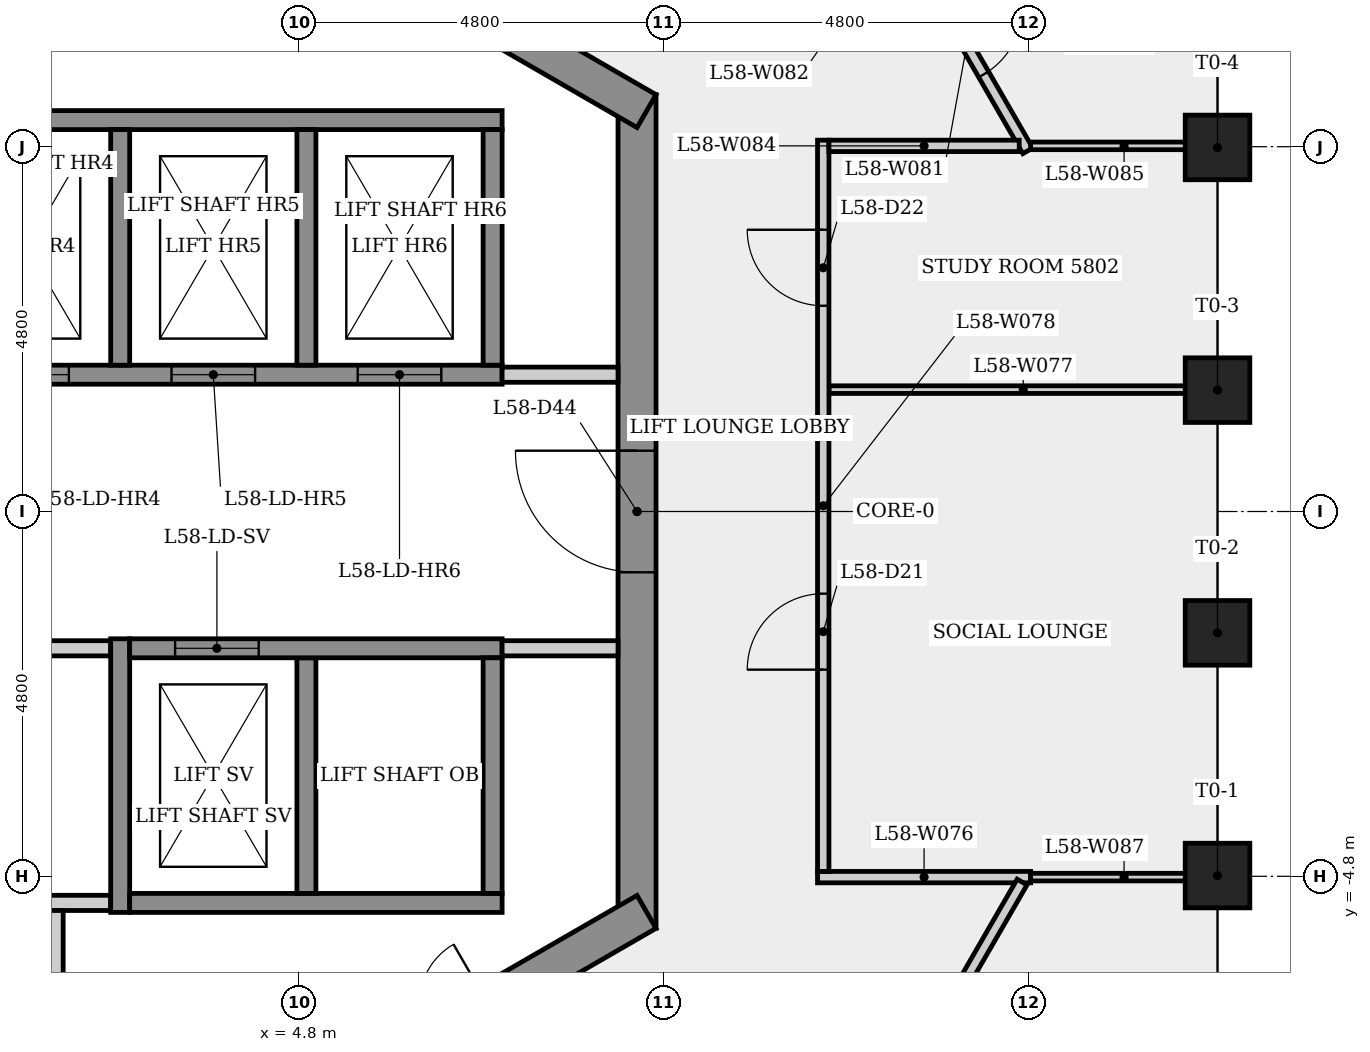
"""IFC4 building model, lengths in metres.
Left out: names, types, materials, properties, quantities, classifications, styles, units other than length and angle.
Written with IfcOpenShell. Run it as: python <this file> out.ifc"""

import sys

from ifc_helpers import new_model, si_unit, direction, frame, frame_2d, origin, origin_2d, place, context, subcontext, project, spatial, rectangle, extrude, element, fill, save


model = new_model("IFC4")
c1 = context("Model", 3, precision=1e-05, world=origin(), true_north=direction((0.0, 1.0)))
c2 = subcontext(c1, "Body", "Model", "MODEL_VIEW")
j1 = project(units=[si_unit("LENGTHUNIT", "METRE"), si_unit("PLANEANGLEUNIT", "RADIAN")], contexts=[c1])
p1 = place(None, origin())
s1 = spatial("IfcSite", under=j1, at=p1, CompositionType="ELEMENT")
p2 = place(p1, origin())
s2 = spatial("IfcBuilding", under=s1, at=p2, CompositionType="ELEMENT")
p3 = place(p2, frame((0.0, 0.0, 218.9)))
s3 = spatial("IfcBuildingStorey", under=s2, at=p3, CompositionType="ELEMENT", Elevation=218.9)
p4 = place(p3, frame((9.25, -5.485, 0.0), z_axis=(0.0, 0.0, 1.0), x_axis=(0.0, 1.0, 0.0)))
e1 = element("IfcWall", 1, at=p4, inside=s3, PredefinedType="SHEAR", context=c2, shape_type="SweptSolid", body=[
    extrude(rectangle(XDim=10.97, YDim=0.5, at=frame_2d((5.485, 0.0))), origin(), (0.0, 0.0, 1.0), 3.4),
])
p5 = place(p4, frame((4.685, 0.0, 0.0)))
e2 = element("IfcOpeningElement", 2, at=p5, cuts=e1, PredefinedType="OPENING", context=c2, shape_type="SweptSolid", body=[
    extrude(rectangle(XDim=1.6, YDim=2.1, at=frame_2d((0.8, 1.05))), frame((0.0, 0.26, 0.0), z_axis=(0.0, -1.0, 0.0), x_axis=(1.0, 0.0, 0.0)), (0.0, 0.0, 1.0), 0.52),
])
p6 = place(p3, frame((9.375, 5.268, 0.0), z_axis=(0.0, 0.0, 1.0), x_axis=(-0.866023993627, 0.500002442456, 0.0)))
e3 = element("IfcWall", 3, at=p6, inside=s3, PredefinedType="SHEAR", context=c2, shape_type="SweptSolid", body=[
    extrude(rectangle(XDim=10.97, YDim=0.5, at=frame_2d((5.485, 0.0))), origin(), (0.0, 0.0, 1.0), 3.4),
])
p7 = place(p6, frame((5.382, 0.0, 0.0)))
e4 = element("IfcOpeningElement", 4, at=p7, cuts=e3, PredefinedType="OPENING", context=c2, shape_type="SweptSolid", body=[
    extrude(rectangle(XDim=0.9, YDim=2.1, at=frame_2d((0.45, 1.05))), frame((0.0, 0.26, 0.0), z_axis=(0.0, -1.0, 0.0), x_axis=(1.0, 0.0, 0.0)), (0.0, 0.0, 1.0), 0.52),
])
p8 = place(p3, frame((-0.125, -10.753, 0.0), z_axis=(0.0, 0.0, 1.0), x_axis=(0.866023993627, 0.500002442456, 0.0)))
e5 = element("IfcWall", 5, at=p8, inside=s3, PredefinedType="SHEAR", context=c2, shape_type="SweptSolid", body=[
    extrude(rectangle(XDim=10.97, YDim=0.5, at=frame_2d((5.485, 0.0))), origin(), (0.0, 0.0, 1.0), 3.4),
])
p9 = place(p8, frame((7.657, 0.0, 0.0)))
e6 = element("IfcOpeningElement", 6, at=p9, cuts=e5, PredefinedType="OPENING", context=c2, shape_type="SweptSolid", body=[
    extrude(rectangle(XDim=0.9, YDim=2.1, at=frame_2d((0.45, 1.05))), frame((0.0, 0.26, 0.0), z_axis=(0.0, -1.0, 0.0), x_axis=(1.0, 0.0, 0.0)), (0.0, 0.0, 1.0), 0.52),
])
for number, where, z_axis, x_axis in (
    (7, (16.887, -4.79, 0.0), (0.0, 0.0, 1.0), (1.0, 0.0, 0.0)),
    (8, (16.887, -1.597, 0.0), (0.0, 0.0, 1.0), (1.0, 0.0, 0.0)),
    (9, (16.887, 1.597, 0.0), (0.0, 0.0, 1.0), (1.0, 0.0, 0.0)),
    (10, (16.887, 4.79, 0.0), (0.0, 0.0, 1.0), (1.0, 0.0, 0.0)),
):
    element("IfcColumn", number, at=place(p3, frame(where, z_axis=z_axis, x_axis=x_axis)), inside=s3, PredefinedType="COLUMN", context=c2, shape_type="SweptSolid", body=[
        extrude(rectangle(XDim=0.85, YDim=0.85, at=origin_2d()), origin(), (0.0, 0.0, 1.0), 3.4),
    ])
p10 = place(p3, frame((-9.0, -5.15, 0.0), z_axis=(0.0, 0.0, 1.0), x_axis=(1.0, 0.0, 0.0)))
e11 = element("IfcWall", 11, at=p10, inside=s3, PredefinedType="PARTITIONING", context=c2, shape_type="SweptSolid", body=[
    extrude(rectangle(XDim=11.325, YDim=0.2, at=frame_2d((5.663, 0.0))), origin(), (0.0, 0.0, 1.0), 3.05),
])
p11 = place(p3, frame((-7.475, 1.8, 0.0), z_axis=(0.0, 0.0, 1.0), x_axis=(1.0, 0.0, 0.0)))
e12 = element("IfcWall", 12, at=p11, inside=s3, PredefinedType="SHEAR", context=c2, shape_type="SweptSolid", body=[
    extrude(rectangle(XDim=14.95, YDim=0.25, at=frame_2d((7.475, 0.0))), origin(), (0.0, 0.0, 1.0), 3.05),
])
p12 = place(p11, frame((0.8, 0.0, 0.0)))
e13 = element("IfcOpeningElement", 13, at=p12, cuts=e12, PredefinedType="OPENING", context=c2, shape_type="SweptSolid", body=[
    extrude(rectangle(XDim=1.1, YDim=2.1, at=frame_2d((0.55, 1.05))), frame((0.0, 0.135, 0.0), z_axis=(0.0, -1.0, 0.0), x_axis=(1.0, 0.0, 0.0)), (0.0, 0.0, 1.0), 0.27),
])
p13 = place(p11, frame((3.25, 0.0, 0.0)))
e14 = element("IfcOpeningElement", 14, at=p13, cuts=e12, PredefinedType="OPENING", context=c2, shape_type="SweptSolid", body=[
    extrude(rectangle(XDim=1.1, YDim=2.1, at=frame_2d((0.55, 1.05))), frame((0.0, 0.135, 0.0), z_axis=(0.0, -1.0, 0.0), x_axis=(1.0, 0.0, 0.0)), (0.0, 0.0, 1.0), 0.27),
])
p14 = place(p11, frame((5.7, 0.0, 0.0)))
e15 = element("IfcOpeningElement", 15, at=p14, cuts=e12, PredefinedType="OPENING", context=c2, shape_type="SweptSolid", body=[
    extrude(rectangle(XDim=1.1, YDim=2.1, at=frame_2d((0.55, 1.05))), frame((0.0, 0.135, 0.0), z_axis=(0.0, -1.0, 0.0), x_axis=(1.0, 0.0, 0.0)), (0.0, 0.0, 1.0), 0.27),
])
p15 = place(p11, frame((8.15, 0.0, 0.0)))
e16 = element("IfcOpeningElement", 16, at=p15, cuts=e12, PredefinedType="OPENING", context=c2, shape_type="SweptSolid", body=[
    extrude(rectangle(XDim=1.1, YDim=2.1, at=frame_2d((0.55, 1.05))), frame((0.0, 0.135, 0.0), z_axis=(0.0, -1.0, 0.0), x_axis=(1.0, 0.0, 0.0)), (0.0, 0.0, 1.0), 0.27),
])
p16 = place(p11, frame((10.6, 0.0, 0.0)))
e17 = element("IfcOpeningElement", 17, at=p16, cuts=e12, PredefinedType="OPENING", context=c2, shape_type="SweptSolid", body=[
    extrude(rectangle(XDim=1.1, YDim=2.1, at=frame_2d((0.55, 1.05))), frame((0.0, 0.135, 0.0), z_axis=(0.0, -1.0, 0.0), x_axis=(1.0, 0.0, 0.0)), (0.0, 0.0, 1.0), 0.27),
])
p17 = place(p11, frame((13.05, 0.0, 0.0)))
e18 = element("IfcOpeningElement", 18, at=p17, cuts=e12, PredefinedType="OPENING", context=c2, shape_type="SweptSolid", body=[
    extrude(rectangle(XDim=1.1, YDim=2.1, at=frame_2d((0.55, 1.05))), frame((0.0, 0.135, 0.0), z_axis=(0.0, -1.0, 0.0), x_axis=(1.0, 0.0, 0.0)), (0.0, 0.0, 1.0), 0.27),
])
p18 = place(p3, frame((-7.225, 5.15, 0.0), z_axis=(0.0, 0.0, 1.0), x_axis=(1.0, 0.0, 0.0)))
e19 = element("IfcWall", 19, at=p18, inside=s3, PredefinedType="SHEAR", context=c2, shape_type="SweptSolid", body=[
    extrude(rectangle(XDim=14.7, YDim=0.25, at=frame_2d((7.35, 0.0))), origin(), (0.0, 0.0, 1.0), 3.05),
])
p19 = place(p3, frame((-9.0, -1.8, 0.0), z_axis=(0.0, 0.0, 1.0), x_axis=(1.0, 0.0, 0.0)))
e20 = element("IfcWall", 20, at=p19, inside=s3, PredefinedType="PARTITIONING", context=c2, shape_type="SweptSolid", body=[
    extrude(rectangle(XDim=11.325, YDim=0.2, at=frame_2d((5.663, 0.0))), origin(), (0.0, 0.0, 1.0), 3.05),
])
p20 = place(p19, frame((2.635, 0.0, 0.0)))
e21 = element("IfcOpeningElement", 21, at=p20, cuts=e20, PredefinedType="OPENING", context=c2, shape_type="SweptSolid", body=[
    extrude(rectangle(XDim=0.9, YDim=2.1, at=frame_2d((0.45, 1.05))), frame((0.0, 0.11, 0.0), z_axis=(0.0, -1.0, 0.0), x_axis=(1.0, 0.0, 0.0)), (0.0, 0.0, 1.0), 0.22),
])
p21 = place(p19, frame((8.488, 0.0, 0.0)))
e22 = element("IfcOpeningElement", 22, at=p21, cuts=e20, PredefinedType="OPENING", context=c2, shape_type="SweptSolid", body=[
    extrude(rectangle(XDim=0.9, YDim=2.1, at=frame_2d((0.45, 1.05))), frame((0.0, 0.11, 0.0), z_axis=(0.0, -1.0, 0.0), x_axis=(1.0, 0.0, 0.0)), (0.0, 0.0, 1.0), 0.22),
])
p22 = place(p3, frame((1.6, -5.25, 0.0), z_axis=(0.0, 0.0, 1.0), x_axis=(0.0, -1.0, 0.0)))
e23 = element("IfcWall", 23, at=p22, inside=s3, PredefinedType="PARTITIONING", context=c2, shape_type="SweptSolid", body=[
    extrude(rectangle(XDim=4.219, YDim=0.2, at=frame_2d((2.109, 0.0))), origin(), (0.0, 0.0, 1.0), 3.05),
])
p23 = place(p3, frame((2.45, -5.275, 0.0), z_axis=(0.0, 0.0, 1.0), x_axis=(0.0, 1.0, 0.0)))
e24 = element("IfcWall", 24, at=p23, inside=s3, PredefinedType="SHEAR", context=c2, shape_type="SweptSolid", body=[
    extrude(rectangle(XDim=3.6, YDim=0.25, at=frame_2d((1.8, 0.0))), origin(), (0.0, 0.0, 1.0), 3.05),
])
p24 = place(p3, frame((2.45, 5.025, 0.0), z_axis=(0.0, 0.0, 1.0), x_axis=(0.0, -1.0, 0.0)))
e25 = element("IfcWall", 25, at=p24, inside=s3, PredefinedType="SHEAR", context=c2, shape_type="SweptSolid", body=[
    extrude(rectangle(XDim=3.1, YDim=0.25, at=frame_2d((1.55, 0.0))), origin(), (0.0, 0.0, 1.0), 3.4),
])
p25 = place(p3, frame((2.575, -5.15, 0.0), z_axis=(0.0, 0.0, 1.0), x_axis=(1.0, 0.0, 0.0)))
e26 = element("IfcWall", 26, at=p25, inside=s3, PredefinedType="SHEAR", context=c2, shape_type="SweptSolid", body=[
    extrude(rectangle(XDim=4.9, YDim=0.25, at=frame_2d((2.45, 0.0))), origin(), (0.0, 0.0, 1.0), 3.05),
])
for number, where, z_axis, x_axis in (
    (27, (4.9, -1.925, 0.0), (0.0, 0.0, 1.0), (0.0, -1.0, 0.0)),
    (28, (4.9, 5.025, 0.0), (0.0, 0.0, 1.0), (0.0, -1.0, 0.0)),
):
    element("IfcWall", number, at=place(p3, frame(where, z_axis=z_axis, x_axis=x_axis)), inside=s3, PredefinedType="SHEAR", context=c2, shape_type="SweptSolid", body=[
        extrude(rectangle(XDim=3.1, YDim=0.25, at=frame_2d((1.55, 0.0))), origin(), (0.0, 0.0, 1.0), 3.4),
    ])
p26 = place(p3, frame((2.575, -1.8, 0.0), z_axis=(0.0, 0.0, 1.0), x_axis=(1.0, 0.0, 0.0)))
e29 = element("IfcWall", 29, at=p26, inside=s3, PredefinedType="SHEAR", context=c2, shape_type="SweptSolid", body=[
    extrude(rectangle(XDim=4.9, YDim=0.25, at=frame_2d((2.45, 0.0))), origin(), (0.0, 0.0, 1.0), 3.05),
])
p27 = place(p26, frame((0.597, 0.0, 0.0)))
e30 = element("IfcOpeningElement", 30, at=p27, cuts=e29, PredefinedType="OPENING", context=c2, shape_type="SweptSolid", body=[
    extrude(rectangle(XDim=1.1, YDim=2.1, at=frame_2d((0.55, 1.05))), frame((0.0, 0.135, 0.0), z_axis=(0.0, -1.0, 0.0), x_axis=(1.0, 0.0, 0.0)), (0.0, 0.0, 1.0), 0.27),
])
p28 = place(p3, frame((7.475, 1.8, 0.0), z_axis=(0.0, 0.0, 1.0), x_axis=(1.0, 0.0, 0.0)))
e31 = element("IfcWall", 31, at=p28, inside=s3, PredefinedType="PARTITIONING", context=c2, shape_type="SweptSolid", body=[
    extrude(rectangle(XDim=1.525, YDim=0.2, at=frame_2d((0.763, 0.0))), origin(), (0.0, 0.0, 1.0), 3.05),
])
for number, where, z_axis, x_axis in (
    (32, (7.35, -1.925, 0.0), (0.0, 0.0, 1.0), (0.0, -1.0, 0.0)),
    (33, (7.35, 5.025, 0.0), (0.0, 0.0, 1.0), (0.0, -1.0, 0.0)),
):
    element("IfcWall", number, at=place(p3, frame(where, z_axis=z_axis, x_axis=x_axis)), inside=s3, PredefinedType="SHEAR", context=c2, shape_type="SweptSolid", body=[
        extrude(rectangle(XDim=3.1, YDim=0.25, at=frame_2d((1.55, 0.0))), origin(), (0.0, 0.0, 1.0), 3.4),
    ])
p29 = place(p3, frame((9.0, -1.8, 0.0), z_axis=(0.0, 0.0, 1.0), x_axis=(-1.0, 0.0, 0.0)))
e34 = element("IfcWall", 34, at=p29, inside=s3, PredefinedType="PARTITIONING", context=c2, shape_type="SweptSolid", body=[
    extrude(rectangle(XDim=1.525, YDim=0.2, at=frame_2d((0.763, 0.0))), origin(), (0.0, 0.0, 1.0), 3.05),
])
p30 = place(p3, frame((11.625, -4.811, 0.0), z_axis=(0.0, 0.0, 1.0), x_axis=(1.0, 0.0, 0.0)))
e35 = element("IfcWall", 35, at=p30, inside=s3, PredefinedType="PARTITIONING", context=c2, shape_type="SweptSolid", body=[
    extrude(rectangle(XDim=2.803, YDim=0.15, at=frame_2d((1.402, 0.0))), origin(), (0.0, 0.0, 1.0), 3.05),
])
p31 = place(p3, frame((11.775, 1.604, 0.0), z_axis=(0.0, 0.0, 1.0), x_axis=(1.0, 0.0, 0.0)))
e36 = element("IfcWall", 36, at=p31, inside=s3, PredefinedType="PARTITIONING", context=c2, shape_type="SweptSolid", body=[
    extrude(rectangle(XDim=5.113, YDim=0.1, at=frame_2d((2.556, 0.0))), origin(), (0.0, 0.0, 1.0), 3.05),
])
p32 = place(p3, frame((11.7, -4.736, 0.0), z_axis=(0.0, 0.0, 1.0), x_axis=(0.0, 1.0, 0.0)))
e37 = element("IfcWall", 37, at=p32, inside=s3, PredefinedType="PARTITIONING", context=c2, shape_type="SweptSolid", body=[
    extrude(rectangle(XDim=9.622, YDim=0.15, at=frame_2d((4.811, 0.0))), origin(), (0.0, 0.0, 1.0), 3.05),
])
p33 = place(p32, frame((2.655, 0.0, 0.0)))
e38 = element("IfcOpeningElement", 38, at=p33, cuts=e37, PredefinedType="OPENING", context=c2, shape_type="SweptSolid", body=[
    extrude(rectangle(XDim=1.0, YDim=2.1, at=frame_2d((0.5, 1.05))), frame((0.0, 0.085, 0.0), z_axis=(0.0, -1.0, 0.0), x_axis=(1.0, 0.0, 0.0)), (0.0, 0.0, 1.0), 0.17),
])
p34 = place(p32, frame((7.443, 0.0, 0.0)))
e39 = element("IfcOpeningElement", 39, at=p34, cuts=e37, PredefinedType="OPENING", context=c2, shape_type="SweptSolid", body=[
    extrude(rectangle(XDim=1.0, YDim=2.1, at=frame_2d((0.5, 1.05))), frame((0.0, 0.085, 0.0), z_axis=(0.0, -1.0, 0.0), x_axis=(1.0, 0.0, 0.0)), (0.0, 0.0, 1.0), 0.17),
])
p35 = place(p3, frame((12.785, 7.528, 0.0), z_axis=(0.0, 0.0, 1.0), x_axis=(0.500038251005, -0.86600331843, 0.0)))
e40 = element("IfcWall", 40, at=p35, inside=s3, PredefinedType="PARTITIONING", context=c2, shape_type="SweptSolid", body=[
    extrude(rectangle(XDim=3.212, YDim=0.15, at=frame_2d((1.606, 0.0))), origin(), (0.0, 0.0, 1.0), 3.05),
])
p36 = place(p35, frame((1.051, 0.0, 0.0)))
e41 = element("IfcOpeningElement", 41, at=p36, cuts=e40, PredefinedType="OPENING", context=c2, shape_type="SweptSolid", body=[
    extrude(rectangle(XDim=1.0, YDim=2.1, at=frame_2d((0.5, 1.05))), frame((0.0, 0.085, 0.0), z_axis=(0.0, -1.0, 0.0), x_axis=(1.0, 0.0, 0.0)), (0.0, 0.0, 1.0), 0.17),
])
p37 = place(p3, frame((14.279, 4.811, 0.0), z_axis=(0.0, 0.0, 1.0), x_axis=(-1.0, 0.0, 0.0)))
e42 = element("IfcWall", 42, at=p37, inside=s3, PredefinedType="PARTITIONING", context=c2, shape_type="SweptSolid", body=[
    extrude(rectangle(XDim=2.504, YDim=0.15, at=frame_2d((1.252, 0.0))), origin(), (0.0, 0.0, 1.0), 3.05),
])
p38 = place(p3, frame((14.428, 4.811, 0.0), z_axis=(0.0, 0.0, 1.0), x_axis=(1.0, 0.0, 0.0)))
e43 = element("IfcWall", 43, at=p38, inside=s3, PredefinedType="PARTITIONING", context=c2, shape_type="SweptSolid", body=[
    extrude(rectangle(XDim=2.459, YDim=0.1, at=frame_2d((1.229, 0.0))), origin(), (0.0, 0.0, 1.0), 3.05),
])
p39 = place(p3, frame((14.316, -4.876, 0.0), z_axis=(0.0, 0.0, 1.0), x_axis=(-0.499994719637, -0.866028452382, 0.0)))
e44 = element("IfcWall", 44, at=p39, inside=s3, PredefinedType="PARTITIONING", context=c2, shape_type="SweptSolid", body=[
    extrude(rectangle(XDim=6.701, YDim=0.15, at=frame_2d((3.351, 0.0))), origin(), (0.0, 0.0, 1.0), 3.05),
])
p40 = place(p39, frame((2.808, 0.0, 0.0)))
e45 = element("IfcOpeningElement", 45, at=p40, cuts=e44, PredefinedType="OPENING", context=c2, shape_type="SweptSolid", body=[
    extrude(rectangle(XDim=1.0, YDim=2.1, at=frame_2d((0.5, 1.05))), frame((0.0, 0.085, 0.0), z_axis=(0.0, -1.0, 0.0), x_axis=(1.0, 0.0, 0.0)), (0.0, 0.0, 1.0), 0.17),
])
p41 = place(p3, frame((16.887, -4.811, 0.0), z_axis=(0.0, 0.0, 1.0), x_axis=(-1.0, 0.0, 0.0)))
e46 = element("IfcWall", 46, at=p41, inside=s3, PredefinedType="PARTITIONING", context=c2, shape_type="SweptSolid", body=[
    extrude(rectangle(XDim=2.459, YDim=0.1, at=frame_2d((1.229, 0.0))), origin(), (0.0, 0.0, 1.0), 3.05),
])
p42 = place(p15, origin())
e47 = element("IfcDoor", 47, at=p42, inside=s3, OperationType="SLIDING_TO_LEFT", PredefinedType="DOOR", context=c2, shape_type="SweptSolid", body=[
    extrude(rectangle(XDim=1.1, YDim=2.1, at=frame_2d((0.55, 1.05))), frame((0.0, 0.025, 0.0), z_axis=(0.0, -1.0, 0.0), x_axis=(1.0, 0.0, 0.0)), (0.0, 0.0, 1.0), 0.05),
])
fill(e16, e47)
p43 = place(p16, origin())
e48 = element("IfcDoor", 48, at=p43, inside=s3, OperationType="SLIDING_TO_LEFT", PredefinedType="DOOR", context=c2, shape_type="SweptSolid", body=[
    extrude(rectangle(XDim=1.1, YDim=2.1, at=frame_2d((0.55, 1.05))), frame((0.0, 0.025, 0.0), z_axis=(0.0, -1.0, 0.0), x_axis=(1.0, 0.0, 0.0)), (0.0, 0.0, 1.0), 0.05),
])
fill(e17, e48)
p44 = place(p17, origin())
e49 = element("IfcDoor", 49, at=p44, inside=s3, OperationType="SLIDING_TO_LEFT", PredefinedType="DOOR", context=c2, shape_type="SweptSolid", body=[
    extrude(rectangle(XDim=1.1, YDim=2.1, at=frame_2d((0.55, 1.05))), frame((0.0, 0.025, 0.0), z_axis=(0.0, -1.0, 0.0), x_axis=(1.0, 0.0, 0.0)), (0.0, 0.0, 1.0), 0.05),
])
fill(e18, e49)
p45 = place(p27, origin())
e50 = element("IfcDoor", 50, at=p45, inside=s3, OperationType="SLIDING_TO_LEFT", PredefinedType="DOOR", context=c2, shape_type="SweptSolid", body=[
    extrude(rectangle(XDim=1.1, YDim=2.1, at=frame_2d((0.55, 1.05))), frame((0.0, 0.025, 0.0), z_axis=(0.0, -1.0, 0.0), x_axis=(1.0, 0.0, 0.0)), (0.0, 0.0, 1.0), 0.05),
])
fill(e30, e50)
p46 = place(p33, origin())
e51 = element("IfcDoor", 51, at=p46, inside=s3, OperationType="SINGLE_SWING_LEFT", PredefinedType="DOOR", context=c2, shape_type="SweptSolid", body=[
    extrude(rectangle(XDim=1.0, YDim=2.1, at=frame_2d((0.5, 1.05))), frame((0.0, 0.025, 0.0), z_axis=(0.0, -1.0, 0.0), x_axis=(1.0, 0.0, 0.0)), (0.0, 0.0, 1.0), 0.05),
])
fill(e38, e51)
p47 = place(p34, origin())
e52 = element("IfcDoor", 52, at=p47, inside=s3, OperationType="SINGLE_SWING_RIGHT", PredefinedType="DOOR", context=c2, shape_type="SweptSolid", body=[
    extrude(rectangle(XDim=1.0, YDim=2.1, at=frame_2d((0.5, 1.05))), frame((0.0, 0.025, 0.0), z_axis=(0.0, -1.0, 0.0), x_axis=(1.0, 0.0, 0.0)), (0.0, 0.0, 1.0), 0.05),
])
fill(e39, e52)
p48 = place(p36, origin())
e53 = element("IfcDoor", 53, at=p48, inside=s3, OperationType="SINGLE_SWING_LEFT", PredefinedType="DOOR", context=c2, shape_type="SweptSolid", body=[
    extrude(rectangle(XDim=1.0, YDim=2.1, at=frame_2d((0.5, 1.05))), frame((0.0, 0.025, 0.0), z_axis=(0.0, -1.0, 0.0), x_axis=(1.0, 0.0, 0.0)), (0.0, 0.0, 1.0), 0.05),
])
fill(e41, e53)
p49 = place(p5, origin())
e54 = element("IfcDoor", 54, at=p49, inside=s3, OperationType="SINGLE_SWING_RIGHT", PredefinedType="DOOR", context=c2, shape_type="SweptSolid", body=[
    extrude(rectangle(XDim=1.6, YDim=2.1, at=frame_2d((0.8, 1.05))), frame((0.0, 0.025, 0.0), z_axis=(0.0, -1.0, 0.0), x_axis=(1.0, 0.0, 0.0)), (0.0, 0.0, 1.0), 0.05),
])
fill(e2, e54)
save(model, sys.argv[1])
